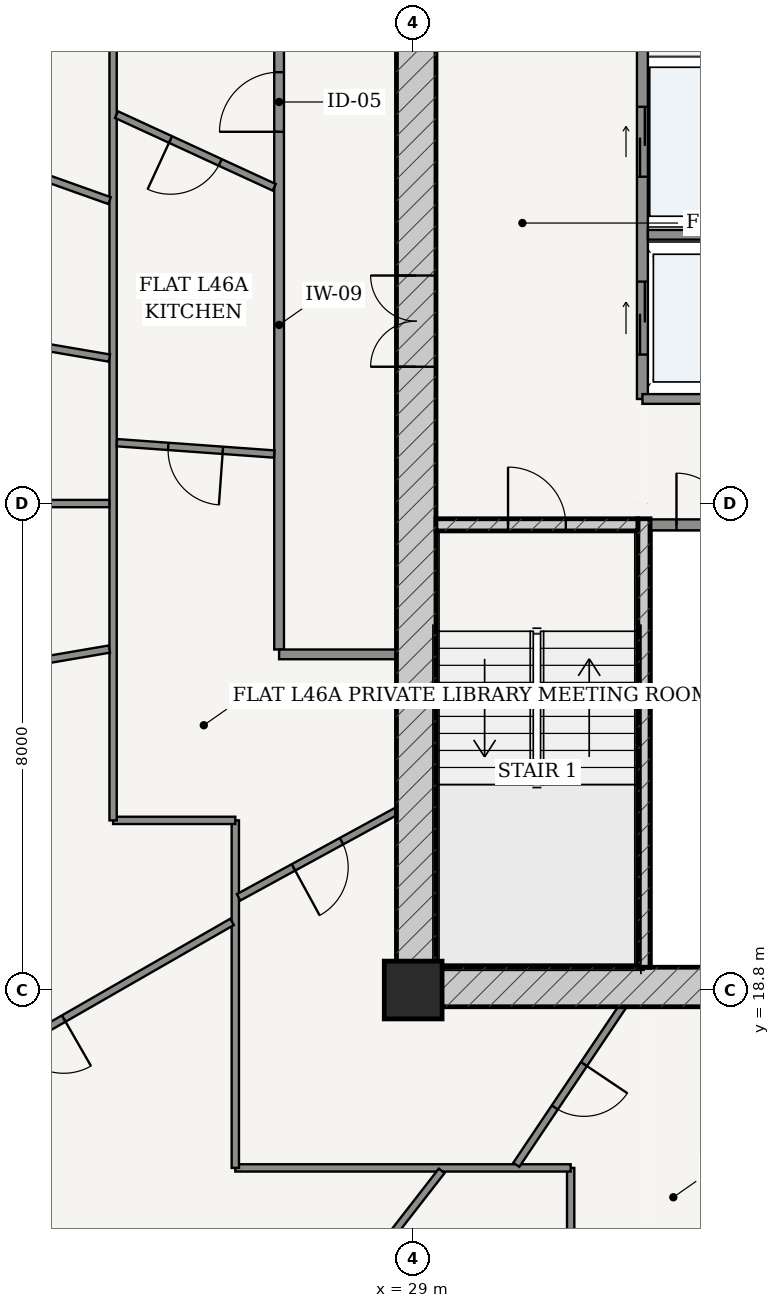
"""IFC4 building model, lengths in metres.
Left out: names, types, materials, properties, quantities, classifications, styles, units other than length and angle.
Written with IfcOpenShell. Run it as: python <this file> out.ifc"""

import sys

from ifc_helpers import new_model, si_unit, direction, frame, frame_2d, origin, origin_2d, place, context, subcontext, project, spatial, rectangle, extrude, source, transform, mapped, element, fill, save


model = new_model("IFC4")
c1 = context("Model", 3, precision=1e-05, world=origin(), true_north=direction((-0.2419218956, 0.970295726276)))
c2 = subcontext(c1, "Body", "Model", "MODEL_VIEW")
j1 = project(units=[si_unit("LENGTHUNIT", "METRE"), si_unit("PLANEANGLEUNIT", "RADIAN")], contexts=[c1])
p1 = place(None, origin())
s1 = spatial("IfcSite", under=j1, at=p1, CompositionType="ELEMENT")
p2 = place(p1, origin())
s2 = spatial("IfcBuilding", under=s1, at=p2, CompositionType="ELEMENT")
p3 = place(p2, frame((0.0, 0.0, 175.0)))
s3 = spatial("IfcBuildingStorey", under=s2, at=p3, CompositionType="ELEMENT", Elevation=175.0)
p4 = place(p3, frame((29.0, 18.8, 0.0), z_axis=(0.0, 0.0, 1.0), x_axis=(1.0, 0.0, 0.0)))
e1 = element("IfcColumn", 1, at=p4, inside=s3, PredefinedType="COLUMN", context=c2, shape_type="SweptSolid", body=[
    extrude(rectangle(XDim=0.95, YDim=0.95, at=origin_2d()), origin(), (0.0, 0.0, 1.0), 3.6),
])
p5 = place(p3, frame((28.725, 18.85, 0.0), z_axis=(0.0, 0.0, 1.0), x_axis=(1.0, 0.0, 0.0)))
e2 = element("IfcWall", 2, at=p5, inside=s3, PredefinedType="SHEAR", context=c2, shape_type="SweptSolid", body=[
    extrude(rectangle(XDim=18.55, YDim=0.65, at=frame_2d((9.275, 0.0))), origin(), (0.0, 0.0, 1.0), 3.33),
])
p6 = place(p5, frame((6.81, 0.0, 0.0)))
e3 = element("IfcOpeningElement", 3, at=p6, cuts=e2, PredefinedType="OPENING", context=c2, shape_type="SweptSolid", body=[
    extrude(rectangle(XDim=0.85, YDim=2.1, at=frame_2d((0.425, 1.05))), frame((0.0, 0.335, 0.0), z_axis=(0.0, -1.0, 0.0), x_axis=(1.0, 0.0, 0.0)), (0.0, 0.0, 1.0), 0.67),
])
p7 = place(p5, frame((8.85, 0.0, 0.0)))
e4 = element("IfcOpeningElement", 4, at=p7, cuts=e2, PredefinedType="OPENING", context=c2, shape_type="SweptSolid", body=[
    extrude(rectangle(XDim=0.85, YDim=2.1, at=frame_2d((0.425, 1.05))), frame((0.0, 0.335, 0.0), z_axis=(0.0, -1.0, 0.0), x_axis=(1.0, 0.0, 0.0)), (0.0, 0.0, 1.0), 0.67),
])
p8 = place(p5, frame((10.89, 0.0, 0.0)))
e5 = element("IfcOpeningElement", 5, at=p8, cuts=e2, PredefinedType="OPENING", context=c2, shape_type="SweptSolid", body=[
    extrude(rectangle(XDim=0.85, YDim=2.1, at=frame_2d((0.425, 1.05))), frame((0.0, 0.335, 0.0), z_axis=(0.0, -1.0, 0.0), x_axis=(1.0, 0.0, 0.0)), (0.0, 0.0, 1.0), 0.67),
])
p9 = place(p3, frame((29.05, 19.175, 0.0), z_axis=(0.0, 0.0, 1.0), x_axis=(0.0, 1.0, 0.0)))
e6 = element("IfcWall", 6, at=p9, inside=s3, PredefinedType="SHEAR", context=c2, shape_type="SweptSolid", body=[
    extrude(rectangle(XDim=15.25, YDim=0.65, at=frame_2d((7.625, 0.0))), origin(), (0.0, 0.0, 1.0), 3.33),
])
p10 = place(p9, frame((9.875, 0.0, 0.0)))
e7 = element("IfcOpeningElement", 7, at=p10, cuts=e6, PredefinedType="OPENING", context=c2, shape_type="SweptSolid", body=[
    extrude(rectangle(XDim=1.5, YDim=2.2, at=frame_2d((0.75, 1.1))), frame((0.0, 0.335, 0.0), z_axis=(0.0, -1.0, 0.0), x_axis=(1.0, 0.0, 0.0)), (0.0, 0.0, 1.0), 0.67),
])
p11 = place(p3, frame((32.795, 19.175, 0.0), z_axis=(0.0, 0.0, 1.0), x_axis=(0.0, 1.0, 0.0)))
e8 = element("IfcWall", 8, at=p11, inside=s3, PredefinedType="SOLIDWALL", context=c2, shape_type="SweptSolid", body=[
    extrude(rectangle(XDim=7.375, YDim=0.2, at=frame_2d((3.688, 0.0))), origin(), (0.0, 0.0, 1.0), 3.33),
])
p12 = place(p3, frame((29.375, 26.45, 0.0), z_axis=(0.0, 0.0, 1.0), x_axis=(1.0, 0.0, 0.0)))
e9 = element("IfcWall", 9, at=p12, inside=s3, PredefinedType="SOLIDWALL", context=c2, shape_type="SweptSolid", body=[
    extrude(rectangle(XDim=3.32, YDim=0.2, at=frame_2d((1.66, 0.0))), origin(), (0.0, 0.0, 1.0), 3.33),
])
p13 = place(p12, frame((1.185, 0.0, 0.0)))
e10 = element("IfcOpeningElement", 10, at=p13, cuts=e9, PredefinedType="OPENING", context=c2, shape_type="SweptSolid", body=[
    extrude(rectangle(XDim=0.95, YDim=2.15, at=frame_2d((0.475, 1.075))), frame((0.0, 0.11, 0.0), z_axis=(0.0, -1.0, 0.0), x_axis=(1.0, 0.0, 0.0)), (0.0, 0.0, 1.0), 0.22),
])
p14 = place(p3, frame((17.843, 15.313, 0.0), z_axis=(0.0, 0.0, 1.0), x_axis=(0.75843401647, -0.651749831348, 0.0)))
e11 = element("IfcWall", 11, at=p14, inside=s3, PredefinedType="SOLIDWALL", context=c2, shape_type="SweptSolid", body=[
    extrude(rectangle(XDim=8.952, YDim=0.28, at=frame_2d((4.476, 0.0))), origin(), (0.0, 0.0, 1.0), 3.33),
])
p15 = place(p14, frame((1.367, 0.0, 0.85)))
e12 = element("IfcOpeningElement", 12, at=p15, cuts=e11, PredefinedType="OPENING", context=c2, shape_type="SweptSolid", body=[
    extrude(rectangle(XDim=2.1, YDim=1.95, at=frame_2d((1.05, 0.975))), frame((0.0, 0.15, 0.0), z_axis=(0.0, -1.0, 0.0), x_axis=(1.0, 0.0, 0.0)), (0.0, 0.0, 1.0), 0.3),
])
p16 = place(p14, frame((5.485, 0.0, 0.85)))
e13 = element("IfcOpeningElement", 13, at=p16, cuts=e11, PredefinedType="OPENING", context=c2, shape_type="SweptSolid", body=[
    extrude(rectangle(XDim=2.1, YDim=1.95, at=frame_2d((1.05, 0.975))), frame((0.0, 0.15, 0.0), z_axis=(0.0, -1.0, 0.0), x_axis=(1.0, 0.0, 0.0)), (0.0, 0.0, 1.0), 0.3),
])
p17 = place(p3, frame((32.9, 26.45, 0.0), z_axis=(0.0, 0.0, 1.0), x_axis=(1.0, 0.0, 0.0)))
e14 = element("IfcWall", 14, at=p17, inside=s3, PredefinedType="PARTITIONING", context=c2, shape_type="SweptSolid", body=[
    extrude(rectangle(XDim=1.71, YDim=0.18, at=frame_2d((0.855, 0.0))), origin(), (0.0, 0.0, 1.0), 3.33),
])
p18 = place(p17, frame((0.43, 0.0, 0.0)))
e15 = element("IfcOpeningElement", 15, at=p18, cuts=e14, PredefinedType="OPENING", context=c2, shape_type="SweptSolid", body=[
    extrude(rectangle(XDim=0.85, YDim=2.1, at=frame_2d((0.425, 1.05))), frame((0.0, 0.1, 0.0), z_axis=(0.0, -1.0, 0.0), x_axis=(1.0, 0.0, 0.0)), (0.0, 0.0, 1.0), 0.2),
])
p19 = place(p3, frame((32.77, 28.52, 0.0), z_axis=(0.0, 0.0, 1.0), x_axis=(0.0, 1.0, 0.0)))
e16 = element("IfcWall", 16, at=p19, inside=s3, PredefinedType="PARTITIONING", context=c2, shape_type="SweptSolid", body=[
    extrude(rectangle(XDim=5.905, YDim=0.18, at=frame_2d((2.953, 0.0))), origin(), (0.0, 0.0, 1.0), 3.33),
])
p20 = place(p19, frame((3.655, 0.0, 0.0)))
e17 = element("IfcOpeningElement", 17, at=p20, cuts=e16, PredefinedType="OPENING", context=c2, shape_type="SweptSolid", body=[
    extrude(rectangle(XDim=1.15, YDim=2.2, at=frame_2d((0.575, 1.1))), frame((0.0, 0.1, 0.0), z_axis=(0.0, -1.0, 0.0), x_axis=(1.0, 0.0, 0.0)), (0.0, 0.0, 1.0), 0.2),
])
p21 = place(p19, frame((0.73, 0.0, 0.0)))
e18 = element("IfcOpeningElement", 18, at=p21, cuts=e16, PredefinedType="OPENING", context=c2, shape_type="SweptSolid", body=[
    extrude(rectangle(XDim=1.2, YDim=2.25, at=frame_2d((0.6, 1.125))), frame((0.0, 0.1, 0.0), z_axis=(0.0, -1.0, 0.0), x_axis=(1.0, 0.0, 0.0)), (0.0, 0.0, 1.0), 0.2),
])
p22 = place(p3, frame((32.86, 31.22, 0.0), z_axis=(0.0, 0.0, 1.0), x_axis=(1.0, 0.0, 0.0)))
e19 = element("IfcWall", 19, at=p22, inside=s3, PredefinedType="PARTITIONING", context=c2, shape_type="SweptSolid", body=[
    extrude(rectangle(XDim=1.75, YDim=0.16, at=frame_2d((0.875, 0.0))), origin(), (0.0, 0.0, 1.0), 3.33),
])
p23 = place(p3, frame((32.77, 28.52, 0.0), z_axis=(0.0, 0.0, 1.0), x_axis=(1.0, 0.0, 0.0)))
e20 = element("IfcWall", 20, at=p23, inside=s3, PredefinedType="PARTITIONING", context=c2, shape_type="SweptSolid", body=[
    extrude(rectangle(XDim=1.84, YDim=0.16, at=frame_2d((0.92, 0.0))), origin(), (0.0, 0.0, 1.0), 3.33),
])
p24 = place(p3, frame((26.795, 24.4, 0.0), z_axis=(0.0, 0.0, 1.0), x_axis=(0.0, 1.0, 0.0)))
e21 = element("IfcWall", 21, at=p24, inside=s3, PredefinedType="PARTITIONING", context=c2, shape_type="SweptSolid", body=[
    extrude(rectangle(XDim=10.675, YDim=0.16, at=frame_2d((5.337, 0.0))), origin(), (0.0, 0.0, 1.0), 2.776),
])
p25 = place(p24, frame((8.514, 0.0, 0.0)))
e22 = element("IfcOpeningElement", 22, at=p25, cuts=e21, PredefinedType="OPENING", context=c2, shape_type="SweptSolid", body=[
    extrude(rectangle(XDim=0.98, YDim=2.2, at=frame_2d((0.49, 1.1))), frame((0.0, 0.09, 0.0), z_axis=(0.0, -1.0, 0.0), x_axis=(1.0, 0.0, 0.0)), (0.0, 0.0, 1.0), 0.18),
])
p26 = place(p3, frame((26.795, 24.32, 0.0), z_axis=(0.0, 0.0, 1.0), x_axis=(1.0, 0.0, 0.0)))
e23 = element("IfcWall", 23, at=p26, inside=s3, PredefinedType="PARTITIONING", context=c2, shape_type="SweptSolid", body=[
    extrude(rectangle(XDim=1.93, YDim=0.16, at=frame_2d((0.965, 0.0))), origin(), (0.0, 0.0, 1.0), 3.33),
])
p27 = place(p3, frame((31.59, 13.865, 0.0), z_axis=(0.0, 0.0, 1.0), x_axis=(0.0, 1.0, 0.0)))
e24 = element("IfcWall", 24, at=p27, inside=s3, PredefinedType="PARTITIONING", context=c2, shape_type="SweptSolid", body=[
    extrude(rectangle(XDim=2.01, YDim=0.12, at=frame_2d((1.005, 0.0))), origin(), (0.0, 0.0, 1.0), 3.005),
])
p28 = place(p3, frame((31.59, 15.875, 0.0), z_axis=(0.0, 0.0, 1.0), x_axis=(-1.0, 0.0, 0.0)))
e25 = element("IfcWall", 25, at=p28, inside=s3, PredefinedType="PARTITIONING", context=c2, shape_type="SweptSolid", body=[
    extrude(rectangle(XDim=5.515, YDim=0.12, at=frame_2d((2.758, 0.0))), origin(), (0.0, 0.0, 1.0), 2.776),
])
p29 = place(p3, frame((26.075, 15.875, 0.0), z_axis=(0.0, 0.0, 1.0), x_axis=(0.0, 1.0, 0.0)))
e26 = element("IfcWall", 26, at=p29, inside=s3, PredefinedType="PARTITIONING", context=c2, shape_type="SweptSolid", body=[
    extrude(rectangle(XDim=5.715, YDim=0.12, at=frame_2d((2.857, 0.0))), origin(), (0.0, 0.0, 1.0), 2.776),
])
p30 = place(p3, frame((26.075, 21.59, 0.0), z_axis=(0.0, 0.0, 1.0), x_axis=(-1.0, 0.0, 0.0)))
e27 = element("IfcWall", 27, at=p30, inside=s3, PredefinedType="PARTITIONING", context=c2, shape_type="SweptSolid", body=[
    extrude(rectangle(XDim=2.01, YDim=0.12, at=frame_2d((1.005, 0.0))), origin(), (0.0, 0.0, 1.0), 3.33),
])
p31 = place(p3, frame((24.065, 21.59, 0.0), z_axis=(0.0, 0.0, 1.0), x_axis=(0.0, 1.0, 0.0)))
e28 = element("IfcWall", 28, at=p31, inside=s3, PredefinedType="PARTITIONING", context=c2, shape_type="SweptSolid", body=[
    extrude(rectangle(XDim=16.295, YDim=0.12, at=frame_2d((8.147, 0.0))), origin(), (0.0, 0.0, 1.0), 2.776),
])
p32 = place(p3, frame((24.007, 31.782, 0.0), z_axis=(0.0, 0.0, 1.0), x_axis=(-0.942077868165, 0.335394231187, 0.0)))
e29 = element("IfcWall", 29, at=p32, inside=s3, PredefinedType="PARTITIONING", context=c2, shape_type="SweptSolid", body=[
    extrude(rectangle(XDim=8.817, YDim=0.12, at=frame_2d((4.408, 0.0))), origin(), (0.0, 0.0, 1.0), 2.846),
])
p33 = place(p32, frame((3.958, 0.0, 0.0)))
e30 = element("IfcOpeningElement", 30, at=p33, cuts=e29, PredefinedType="OPENING", context=c2, shape_type="SweptSolid", body=[
    extrude(rectangle(XDim=0.9, YDim=2.15, at=frame_2d((0.45, 1.075))), frame((0.0, 0.07, 0.0), z_axis=(0.0, -1.0, 0.0), x_axis=(1.0, 0.0, 0.0)), (0.0, 0.0, 1.0), 0.14),
])
p34 = place(p3, frame((24.004, 29.193, 0.0), z_axis=(0.0, 0.0, 1.0), x_axis=(-0.985698378271, 0.168519159369, 0.0)))
e31 = element("IfcWall", 31, at=p34, inside=s3, PredefinedType="PARTITIONING", context=c2, shape_type="SweptSolid", body=[
    extrude(rectangle(XDim=9.769, YDim=0.12, at=frame_2d((4.884, 0.0))), origin(), (0.0, 0.0, 1.0), 2.776),
])
p35 = place(p34, frame((3.428, 0.0, 0.0)))
e32 = element("IfcOpeningElement", 32, at=p35, cuts=e31, PredefinedType="OPENING", context=c2, shape_type="SweptSolid", body=[
    extrude(rectangle(XDim=0.9, YDim=2.15, at=frame_2d((0.45, 1.075))), frame((0.0, 0.07, 0.0), z_axis=(0.0, -1.0, 0.0), x_axis=(1.0, 0.0, 0.0)), (0.0, 0.0, 1.0), 0.14),
])
p36 = place(p3, frame((24.003, 26.8, 0.0), z_axis=(0.0, 0.0, 1.0), x_axis=(-1.0, 0.0, 0.0)))
e33 = element("IfcWall", 33, at=p36, inside=s3, PredefinedType="PARTITIONING", context=c2, shape_type="SweptSolid", body=[
    extrude(rectangle(XDim=10.143, YDim=0.12, at=frame_2d((5.071, 0.0))), origin(), (0.0, 0.0, 1.0), 2.846),
])
p37 = place(p36, frame((4.622, 0.0, 0.0)))
e34 = element("IfcOpeningElement", 34, at=p37, cuts=e33, PredefinedType="OPENING", context=c2, shape_type="SweptSolid", body=[
    extrude(rectangle(XDim=0.9, YDim=2.15, at=frame_2d((0.45, 1.075))), frame((0.0, 0.07, 0.0), z_axis=(0.0, -1.0, 0.0), x_axis=(1.0, 0.0, 0.0)), (0.0, 0.0, 1.0), 0.14),
])
p38 = place(p3, frame((24.004, 24.407, 0.0), z_axis=(0.0, 0.0, 1.0), x_axis=(-0.985698378271, -0.168519159369, 0.0)))
e35 = element("IfcWall", 35, at=p38, inside=s3, PredefinedType="PARTITIONING", context=c2, shape_type="SweptSolid", body=[
    extrude(rectangle(XDim=9.769, YDim=0.12, at=frame_2d((4.884, 0.0))), origin(), (0.0, 0.0, 1.0), 2.776),
])
p39 = place(p38, frame((3.428, 0.0, 0.0)))
e36 = element("IfcOpeningElement", 36, at=p39, cuts=e35, PredefinedType="OPENING", context=c2, shape_type="SweptSolid", body=[
    extrude(rectangle(XDim=0.9, YDim=2.15, at=frame_2d((0.45, 1.075))), frame((0.0, 0.07, 0.0), z_axis=(0.0, -1.0, 0.0), x_axis=(1.0, 0.0, 0.0)), (0.0, 0.0, 1.0), 0.14),
])
p40 = place(p3, frame((26.021, 19.921, 0.0), z_axis=(0.0, 0.0, 1.0), x_axis=(-0.867161148693, -0.498027652041, 0.0)))
e37 = element("IfcWall", 37, at=p40, inside=s3, PredefinedType="PARTITIONING", context=c2, shape_type="SweptSolid", body=[
    extrude(rectangle(XDim=9.279, YDim=0.12, at=frame_2d((4.64, 0.0))), origin(), (0.0, 0.0, 1.0), 2.776),
])
p41 = place(p40, frame((3.192, 0.0, 0.0)))
e38 = element("IfcOpeningElement", 38, at=p41, cuts=e37, PredefinedType="OPENING", context=c2, shape_type="SweptSolid", body=[
    extrude(rectangle(XDim=0.9, YDim=2.15, at=frame_2d((0.45, 1.075))), frame((0.0, 0.07, 0.0), z_axis=(0.0, -1.0, 0.0), x_axis=(1.0, 0.0, 0.0)), (0.0, 0.0, 1.0), 0.14),
])
p42 = place(p3, frame((29.469, 15.826, 0.0), z_axis=(0.0, 0.0, 1.0), x_axis=(-0.61373942367, -0.789508657225, 0.0)))
e39 = element("IfcWall", 39, at=p42, inside=s3, PredefinedType="PARTITIONING", context=c2, shape_type="SweptSolid", body=[
    extrude(rectangle(XDim=7.898, YDim=0.12, at=frame_2d((3.949, 0.0))), origin(), (0.0, 0.0, 1.0), 2.776),
])
p43 = place(p42, frame((2.5, 0.0, 0.0)))
e40 = element("IfcOpeningElement", 40, at=p43, cuts=e39, PredefinedType="OPENING", context=c2, shape_type="SweptSolid", body=[
    extrude(rectangle(XDim=0.9, YDim=2.15, at=frame_2d((0.45, 1.075))), frame((0.0, 0.07, 0.0), z_axis=(0.0, -1.0, 0.0), x_axis=(1.0, 0.0, 0.0)), (0.0, 0.0, 1.0), 0.14),
])
p44 = place(p3, frame((26.715, 32.001, 0.0), z_axis=(0.0, 0.0, 1.0), x_axis=(-0.90819942915, 0.418537688735, 0.0)))
e41 = element("IfcWall", 41, at=p44, inside=s3, PredefinedType="PARTITIONING", context=c2, shape_type="SweptSolid", body=[
    extrude(rectangle(XDim=2.856, YDim=0.12, at=frame_2d((1.428, 0.0))), origin(), (0.0, 0.0, 1.0), 3.33),
])
p45 = place(p44, frame((0.978, 0.0, 0.0)))
e42 = element("IfcOpeningElement", 42, at=p45, cuts=e41, PredefinedType="OPENING", context=c2, shape_type="SweptSolid", body=[
    extrude(rectangle(XDim=0.9, YDim=2.15, at=frame_2d((0.45, 1.075))), frame((0.0, 0.07, 0.0), z_axis=(0.0, -1.0, 0.0), x_axis=(1.0, 0.0, 0.0)), (0.0, 0.0, 1.0), 0.14),
])
p46 = place(p3, frame((26.715, 27.615, 0.0), z_axis=(0.0, 0.0, 1.0), x_axis=(-0.997406375801, 0.071975839778, 0.0)))
e43 = element("IfcWall", 43, at=p46, inside=s3, PredefinedType="PARTITIONING", context=c2, shape_type="SweptSolid", body=[
    extrude(rectangle(XDim=2.595, YDim=0.12, at=frame_2d((1.297, 0.0))), origin(), (0.0, 0.0, 1.0), 3.33),
])
p47 = place(p46, frame((0.847, 0.0, 0.0)))
e44 = element("IfcOpeningElement", 44, at=p47, cuts=e43, PredefinedType="OPENING", context=c2, shape_type="SweptSolid", body=[
    extrude(rectangle(XDim=0.9, YDim=2.15, at=frame_2d((0.45, 1.075))), frame((0.0, 0.07, 0.0), z_axis=(0.0, -1.0, 0.0), x_axis=(1.0, 0.0, 0.0)), (0.0, 0.0, 1.0), 0.14),
])
p48 = place(p3, frame((28.723, 21.74, 0.0), z_axis=(0.0, 0.0, 1.0), x_axis=(-0.877892414948, -0.47885792024, 0.0)))
e45 = element("IfcWall", 45, at=p48, inside=s3, PredefinedType="PARTITIONING", context=c2, shape_type="SweptSolid", body=[
    extrude(rectangle(XDim=2.955, YDim=0.12, at=frame_2d((1.477, 0.0))), origin(), (0.0, 0.0, 1.0), 3.33),
])
p49 = place(p48, frame((1.027, 0.0, 0.0)))
e46 = element("IfcOpeningElement", 46, at=p49, cuts=e45, PredefinedType="OPENING", context=c2, shape_type="SweptSolid", body=[
    extrude(rectangle(XDim=0.9, YDim=2.15, at=frame_2d((0.45, 1.075))), frame((0.0, 0.07, 0.0), z_axis=(0.0, -1.0, 0.0), x_axis=(1.0, 0.0, 0.0)), (0.0, 0.0, 1.0), 0.14),
])
p50 = place(p3, frame((32.441, 18.525, 0.0), z_axis=(0.0, 0.0, 1.0), x_axis=(-0.557594690071, -0.830113342625, 0.0)))
e47 = element("IfcWall", 47, at=p50, inside=s3, PredefinedType="PARTITIONING", context=c2, shape_type="SweptSolid", body=[
    extrude(rectangle(XDim=3.13, YDim=0.12, at=frame_2d((1.565, 0.0))), origin(), (0.0, 0.0, 1.0), 3.33),
])
p51 = place(p50, frame((1.135, 0.0, 0.0)))
e48 = element("IfcOpeningElement", 48, at=p51, cuts=e47, PredefinedType="OPENING", context=c2, shape_type="SweptSolid", body=[
    extrude(rectangle(XDim=0.86, YDim=2.15, at=frame_2d((0.43, 1.075))), frame((0.0, 0.07, 0.0), z_axis=(0.0, -1.0, 0.0), x_axis=(1.0, 0.0, 0.0)), (0.0, 0.0, 1.0), 0.14),
])
m1 = source(origin(), c2, "Body", "SweptSolid", [
    extrude(rectangle(XDim=1.5, YDim=2.2, at=frame_2d((0.75, 1.1))), frame((0.0, 0.025, 0.0), z_axis=(0.0, -1.0, 0.0), x_axis=(1.0, 0.0, 0.0)), (0.0, 0.0, 1.0), 0.05),
])
p52 = place(p10, origin())
e49 = element("IfcDoor", 49, at=p52, inside=s3, OperationType="DOUBLE_DOOR_SINGLE_SWING", PredefinedType="DOOR", context=c2, shape_type="MappedRepresentation", body=[
    mapped(m1, transform((0.0, 0.0, 0.0), scale=1.0)),
])
fill(e7, e49)
m2 = source(origin(), c2, "Body", "SweptSolid", [
    extrude(rectangle(XDim=0.95, YDim=2.15, at=frame_2d((0.475, 1.075))), frame((0.0, 0.025, 0.0), z_axis=(0.0, -1.0, 0.0), x_axis=(1.0, 0.0, 0.0)), (0.0, 0.0, 1.0), 0.05),
])
p53 = place(p13, origin())
e50 = element("IfcDoor", 50, at=p53, inside=s3, OperationType="SINGLE_SWING_LEFT", PredefinedType="DOOR", context=c2, shape_type="MappedRepresentation", body=[
    mapped(m2, transform((0.0, 0.0, 0.0), scale=1.0)),
])
fill(e10, e50)
m3 = source(origin(), c2, "Body", "SweptSolid", [
    extrude(rectangle(XDim=0.85, YDim=2.1, at=frame_2d((0.425, 1.05))), frame((0.0, 0.025, 0.0), z_axis=(0.0, -1.0, 0.0), x_axis=(1.0, 0.0, 0.0)), (0.0, 0.0, 1.0), 0.05),
])
p54 = place(p18, origin())
e51 = element("IfcDoor", 51, at=p54, inside=s3, OperationType="SINGLE_SWING_LEFT", PredefinedType="DOOR", context=c2, shape_type="MappedRepresentation", body=[
    mapped(m3, transform((0.0, 0.0, 0.0), scale=1.0)),
])
fill(e15, e51)
m4 = source(origin(), c2, "Body", "SweptSolid", [
    extrude(rectangle(XDim=1.15, YDim=2.2, at=frame_2d((0.575, 1.1))), frame((0.0, 0.025, 0.0), z_axis=(0.0, -1.0, 0.0), x_axis=(1.0, 0.0, 0.0)), (0.0, 0.0, 1.0), 0.05),
])
p55 = place(p20, origin())
e52 = element("IfcDoor", 52, at=p55, inside=s3, OperationType="DOUBLE_DOOR_SLIDING", PredefinedType="DOOR", context=c2, shape_type="MappedRepresentation", body=[
    mapped(m4, transform((0.0, 0.0, 0.0), scale=1.0)),
])
fill(e17, e52)
m5 = source(origin(), c2, "Body", "SweptSolid", [
    extrude(rectangle(XDim=1.2, YDim=2.25, at=frame_2d((0.6, 1.125))), frame((0.0, 0.025, 0.0), z_axis=(0.0, -1.0, 0.0), x_axis=(1.0, 0.0, 0.0)), (0.0, 0.0, 1.0), 0.05),
])
p56 = place(p21, origin())
e53 = element("IfcDoor", 53, at=p56, inside=s3, OperationType="DOUBLE_DOOR_SLIDING", PredefinedType="DOOR", context=c2, shape_type="MappedRepresentation", body=[
    mapped(m5, transform((0.0, 0.0, 0.0), scale=1.0)),
])
fill(e18, e53)
m6 = source(origin(), c2, "Body", "SweptSolid", [
    extrude(rectangle(XDim=0.98, YDim=2.2, at=frame_2d((0.49, 1.1))), frame((0.0, 0.025, 0.0), z_axis=(0.0, -1.0, 0.0), x_axis=(1.0, 0.0, 0.0)), (0.0, 0.0, 1.0), 0.05),
])
p57 = place(p25, origin())
e54 = element("IfcDoor", 54, at=p57, inside=s3, OperationType="SINGLE_SWING_LEFT", PredefinedType="DOOR", context=c2, shape_type="MappedRepresentation", body=[
    mapped(m6, transform((0.0, 0.0, 0.0), scale=1.0)),
])
fill(e22, e54)
m7 = source(origin(), c2, "Body", "SweptSolid", [
    extrude(rectangle(XDim=0.9, YDim=2.15, at=frame_2d((0.45, 1.075))), frame((0.0, 0.025, 0.0), z_axis=(0.0, -1.0, 0.0), x_axis=(1.0, 0.0, 0.0)), (0.0, 0.0, 1.0), 0.05),
])
p58 = place(p45, origin())
e55 = element("IfcDoor", 55, at=p58, inside=s3, OperationType="SINGLE_SWING_RIGHT", PredefinedType="DOOR", context=c2, shape_type="MappedRepresentation", body=[
    mapped(m7, transform((0.0, 0.0, 0.0), scale=1.0)),
])
fill(e42, e55)
p59 = place(p47, origin())
e56 = element("IfcDoor", 56, at=p59, inside=s3, OperationType="SINGLE_SWING_LEFT", PredefinedType="DOOR", context=c2, shape_type="MappedRepresentation", body=[
    mapped(m7, transform((0.0, 0.0, 0.0), scale=1.0)),
])
fill(e44, e56)
p60 = place(p49, origin())
e57 = element("IfcDoor", 57, at=p60, inside=s3, OperationType="SINGLE_SWING_RIGHT", PredefinedType="DOOR", context=c2, shape_type="MappedRepresentation", body=[
    mapped(m7, transform((0.0, 0.0, 0.0), scale=1.0)),
])
fill(e46, e57)
m8 = source(origin(), c2, "Body", "SweptSolid", [
    extrude(rectangle(XDim=0.86, YDim=2.15, at=frame_2d((0.43, 1.075))), frame((0.0, 0.025, 0.0), z_axis=(0.0, -1.0, 0.0), x_axis=(1.0, 0.0, 0.0)), (0.0, 0.0, 1.0), 0.05),
])
p61 = place(p51, origin())
e58 = element("IfcDoor", 58, at=p61, inside=s3, OperationType="SINGLE_SWING_LEFT", PredefinedType="DOOR", context=c2, shape_type="MappedRepresentation", body=[
    mapped(m8, transform((0.0, 0.0, 0.0), scale=1.0)),
])
fill(e48, e58)
p62 = place(p41, origin())
e59 = element("IfcDoor", 59, at=p62, inside=s3, OperationType="SINGLE_SWING_LEFT", PredefinedType="DOOR", context=c2, shape_type="MappedRepresentation", body=[
    mapped(m7, transform((0.0, 0.0, 0.0), scale=1.0)),
])
fill(e38, e59)
save(model, sys.argv[1])
